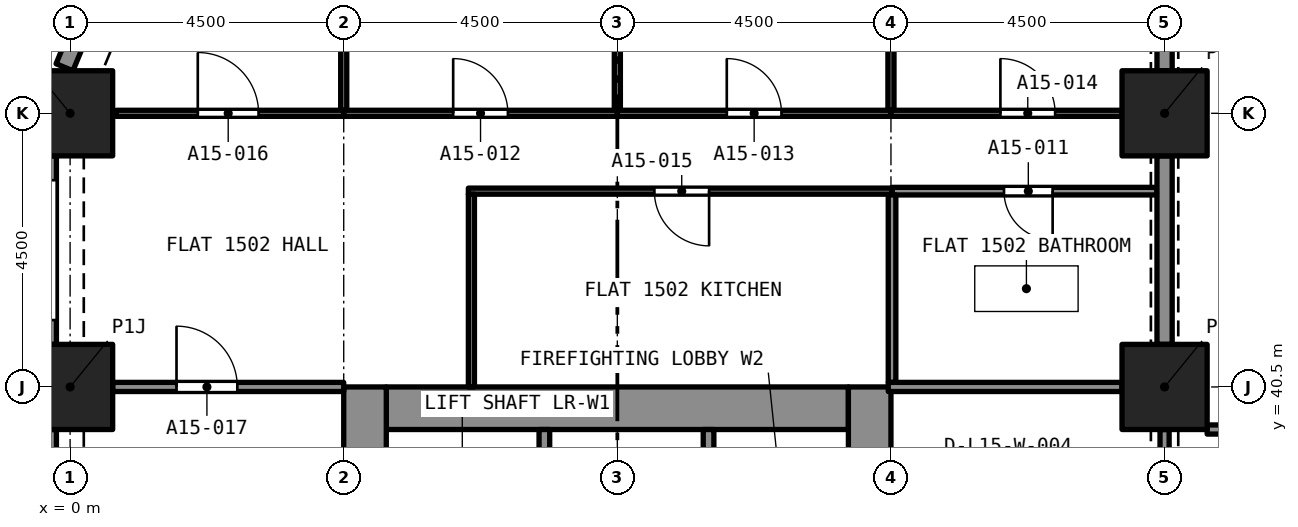
"""IFC4 building model, lengths in metres.
Left out: names, types, materials, properties, quantities, classifications, styles, units other than length and angle.
Written with IfcOpenShell. Run it as: python <this file> out.ifc"""

import sys

from ifc_helpers import new_model, si_unit, direction, frame, frame_2d, origin, origin_2d, place, context, subcontext, project, spatial, rectangle, extrude, element, fill, save


model = new_model("IFC4")
c1 = context("Model", 3, precision=1e-05, world=origin(), true_north=direction((0.0, 1.0)))
c2 = subcontext(c1, "Body", "Model", "MODEL_VIEW")
j1 = project(units=[si_unit("LENGTHUNIT", "METRE"), si_unit("PLANEANGLEUNIT", "RADIAN")], contexts=[c1])
p1 = place(None, origin())
s1 = spatial("IfcSite", under=j1, at=p1, CompositionType="ELEMENT")
p2 = place(p1, origin())
s2 = spatial("IfcBuilding", under=s1, at=p2, CompositionType="ELEMENT")
p3 = place(p2, frame((0.0, 0.0, 59.2)))
s3 = spatial("IfcBuildingStorey", under=s2, at=p3, CompositionType="ELEMENT", Elevation=59.2)
for number, where, z_axis, x_axis in (
    (1, (0.0, 40.5, 0.0), (0.0, 0.0, 1.0), (1.0, 0.0, 0.0)),
    (2, (18.0, 40.5, 0.0), (0.0, 0.0, 1.0), (1.0, 0.0, 0.0)),
    (3, (0.0, 45.0, 0.0), (0.0, 0.0, 1.0), (1.0, 0.0, 0.0)),
    (4, (18.0, 45.0, 0.0), (0.0, 0.0, 1.0), (1.0, 0.0, 0.0)),
):
    element("IfcColumn", number, at=place(p3, frame(where, z_axis=z_axis, x_axis=x_axis)), inside=s3, PredefinedType="COLUMN", context=c2, shape_type="SweptSolid", body=[
        extrude(rectangle(XDim=1.4, YDim=1.4, at=origin_2d()), origin(), (0.0, 0.0, 1.0), 3.2),
    ])
p4 = place(p3, frame((5.2, 40.15, 0.0), z_axis=(0.0, 0.0, 1.0), x_axis=(1.0, 0.0, 0.0)))
e5 = element("IfcWall", 5, at=p4, inside=s3, PredefinedType="SOLIDWALL", context=c2, shape_type="SweptSolid", body=[
    extrude(rectangle(XDim=7.6, YDim=0.7, at=frame_2d((3.8, 0.0))), origin(), (0.0, 0.0, 1.0), 3.2),
])
p5 = place(p3, frame((4.85, 27.0, 0.0), z_axis=(0.0, 0.0, 1.0), x_axis=(0.0, 1.0, 0.0)))
e6 = element("IfcWall", 6, at=p5, inside=s3, PredefinedType="SOLIDWALL", context=c2, shape_type="SweptSolid", body=[
    extrude(rectangle(XDim=13.5, YDim=0.7, at=frame_2d((6.75, 0.0))), origin(), (0.0, 0.0, 1.0), 3.2),
])
p6 = place(p5, frame((8.95, 0.0, 0.0)))
e7 = element("IfcOpeningElement", 7, at=p6, cuts=e6, PredefinedType="OPENING", context=c2, shape_type="SweptSolid", body=[
    extrude(rectangle(XDim=1.2, YDim=2.1, at=frame_2d((0.6, 1.05))), frame((0.0, 0.36, 0.0), z_axis=(0.0, -1.0, 0.0), x_axis=(1.0, 0.0, 0.0)), (0.0, 0.0, 1.0), 0.72),
])
p7 = place(p3, frame((13.15, 27.0, 0.0), z_axis=(0.0, 0.0, 1.0), x_axis=(0.0, 1.0, 0.0)))
e8 = element("IfcWall", 8, at=p7, inside=s3, PredefinedType="SOLIDWALL", context=c2, shape_type="SweptSolid", body=[
    extrude(rectangle(XDim=13.5, YDim=0.7, at=frame_2d((6.75, 0.0))), origin(), (0.0, 0.0, 1.0), 3.2),
])
p8 = place(p7, frame((11.1, 0.0, 0.0)))
e9 = element("IfcOpeningElement", 9, at=p8, cuts=e8, PredefinedType="OPENING", context=c2, shape_type="SweptSolid", body=[
    extrude(rectangle(XDim=1.1, YDim=2.1, at=frame_2d((0.55, 1.05))), frame((0.0, 0.36, 0.0), z_axis=(0.0, -1.0, 0.0), x_axis=(1.0, 0.0, 0.0)), (0.0, 0.0, 1.0), 0.72),
])
p9 = place(p7, frame((8.95, 0.0, 0.0)))
e10 = element("IfcOpeningElement", 10, at=p9, cuts=e8, PredefinedType="OPENING", context=c2, shape_type="SweptSolid", body=[
    extrude(rectangle(XDim=1.2, YDim=2.1, at=frame_2d((0.6, 1.05))), frame((0.0, 0.36, 0.0), z_axis=(0.0, -1.0, 0.0), x_axis=(1.0, 0.0, 0.0)), (0.0, 0.0, 1.0), 0.72),
])
p10 = place(p3, frame((-0.092, 45.757, 0.0), z_axis=(0.0, 0.0, 1.0), x_axis=(0.382737135771, 0.923857286003, 0.0)))
e11 = element("IfcWall", 11, at=p10, inside=s3, PredefinedType="SOLIDWALL", context=c2, shape_type="SweptSolid", body=[
    extrude(rectangle(XDim=1.865, YDim=0.3, at=frame_2d((0.933, 0.0))), origin(), (0.0, 0.0, 1.0), 3.2),
])
p11 = place(p10, frame((0.508, 0.0, 0.45)))
e12 = element("IfcOpeningElement", 12, at=p11, cuts=e11, PredefinedType="OPENING", context=c2, shape_type="SweptSolid", body=[
    extrude(rectangle(XDim=1.1, YDim=1.95, at=frame_2d((0.55, 0.975))), frame((0.0, 0.16, 0.0), z_axis=(0.0, -1.0, 0.0), x_axis=(1.0, 0.0, 0.0)), (0.0, 0.0, 1.0), 0.32),
])
p12 = place(p3, frame((-0.375, 41.2, 0.0), z_axis=(0.0, 0.0, 1.0), x_axis=(0.0, 1.0, 0.0)))
e13 = element("IfcWall", 13, at=p12, inside=s3, PredefinedType="SOLIDWALL", context=c2, shape_type="SweptSolid", body=[
    extrude(rectangle(XDim=3.1, YDim=0.3, at=frame_2d((1.55, 0.0))), origin(), (0.0, 0.0, 1.0), 3.2),
])
p13 = place(p12, frame((0.4, 0.0, 0.45)))
e14 = element("IfcOpeningElement", 14, at=p13, cuts=e13, PredefinedType="OPENING", context=c2, shape_type="SweptSolid", body=[
    extrude(rectangle(XDim=2.3, YDim=1.95, at=frame_2d((1.15, 0.975))), frame((0.0, 0.16, 0.0), z_axis=(0.0, -1.0, 0.0), x_axis=(1.0, 0.0, 0.0)), (0.0, 0.0, 1.0), 0.32),
])
p14 = place(p3, frame((-0.375, 36.7, 0.0), z_axis=(0.0, 0.0, 1.0), x_axis=(0.0, 1.0, 0.0)))
e15 = element("IfcWall", 15, at=p14, inside=s3, PredefinedType="SOLIDWALL", context=c2, shape_type="SweptSolid", body=[
    extrude(rectangle(XDim=3.1, YDim=0.3, at=frame_2d((1.55, 0.0))), origin(), (0.0, 0.0, 1.0), 3.2),
])
p15 = place(p14, frame((0.4, 0.0, 0.45)))
e16 = element("IfcOpeningElement", 16, at=p15, cuts=e15, PredefinedType="OPENING", context=c2, shape_type="SweptSolid", body=[
    extrude(rectangle(XDim=2.3, YDim=1.95, at=frame_2d((1.15, 0.975))), frame((0.0, 0.16, 0.0), z_axis=(0.0, -1.0, 0.0), x_axis=(1.0, 0.0, 0.0)), (0.0, 0.0, 1.0), 0.32),
])
p16 = place(p3, frame((17.875, 43.72, 0.0), z_axis=(0.0, 0.0, 1.0), x_axis=(-1.0, 0.0, 0.0)))
e17 = element("IfcWall", 17, at=p16, inside=s3, PredefinedType="PARTITIONING", context=c2, shape_type="SweptSolid", body=[
    extrude(rectangle(XDim=4.357, YDim=0.125, at=frame_2d((2.178, 0.0))), origin(), (0.0, 0.0, 1.0), 2.9),
])
p17 = place(p16, frame((1.716, 0.0, 0.0)))
e18 = element("IfcOpeningElement", 18, at=p17, cuts=e17, PredefinedType="OPENING", context=c2, shape_type="SweptSolid", body=[
    extrude(rectangle(XDim=0.8, YDim=2.1, at=frame_2d((0.4, 1.05))), frame((0.0, 0.073, 0.0), z_axis=(0.0, -1.0, 0.0), x_axis=(1.0, 0.0, 0.0)), (0.0, 0.0, 1.0), 0.145),
])
p18 = place(p3, frame((13.518, 40.575, 0.0), z_axis=(0.0, 0.0, 1.0), x_axis=(0.0, 1.0, 0.0)))
e19 = element("IfcWall", 19, at=p18, inside=s3, PredefinedType="PARTITIONING", context=c2, shape_type="SweptSolid", body=[
    extrude(rectangle(XDim=3.083, YDim=0.125, at=frame_2d((1.541, 0.0))), origin(), (0.0, 0.0, 1.0), 2.9),
])
p19 = place(p3, frame((18.0, 41.2, 0.0), z_axis=(0.0, 0.0, 1.0), x_axis=(0.0, 1.0, 0.0)))
e20 = element("IfcWall", 20, at=p19, inside=s3, PredefinedType="PARTITIONING", context=c2, shape_type="SweptSolid", body=[
    extrude(rectangle(XDim=3.1, YDim=0.25, at=frame_2d((1.55, 0.0))), origin(), (0.0, 0.0, 1.0), 2.38),
])
p20 = place(p3, frame((13.456, 40.5, 0.0), z_axis=(0.0, 0.0, 1.0), x_axis=(1.0, 0.0, 0.0)))
e21 = element("IfcWall", 21, at=p20, inside=s3, PredefinedType="PARTITIONING", context=c2, shape_type="SweptSolid", body=[
    extrude(rectangle(XDim=3.844, YDim=0.15, at=frame_2d((1.922, 0.0))), origin(), (0.0, 0.0, 1.0), 2.9),
])
p21 = place(p3, frame((9.0, 45.05, 0.0), z_axis=(0.0, 0.0, 1.0), x_axis=(0.0, 1.0, 0.0)))
e22 = element("IfcWall", 22, at=p21, inside=s3, PredefinedType="PARTITIONING", context=c2, shape_type="SweptSolid", body=[
    extrude(rectangle(XDim=3.75, YDim=0.1, at=frame_2d((1.875, 0.0))), origin(), (0.0, 0.0, 1.0), 2.9),
])
p22 = place(p3, frame((4.5, 45.0, 0.0), z_axis=(0.0, 0.0, 1.0), x_axis=(1.0, 0.0, 0.0)))
e23 = element("IfcWall", 23, at=p22, inside=s3, PredefinedType="PARTITIONING", context=c2, shape_type="SweptSolid", body=[
    extrude(rectangle(XDim=4.5, YDim=0.1, at=frame_2d((2.25, 0.0))), origin(), (0.0, 0.0, 1.0), 2.9),
])
p23 = place(p22, frame((1.8, 0.0, 0.0)))
e24 = element("IfcOpeningElement", 24, at=p23, cuts=e23, PredefinedType="OPENING", context=c2, shape_type="SweptSolid", body=[
    extrude(rectangle(XDim=0.9, YDim=2.1, at=frame_2d((0.45, 1.05))), frame((0.0, 0.06, 0.0), z_axis=(0.0, -1.0, 0.0), x_axis=(1.0, 0.0, 0.0)), (0.0, 0.0, 1.0), 0.12),
])
p24 = place(p3, frame((4.5, 45.05, 0.0), z_axis=(0.0, 0.0, 1.0), x_axis=(0.0, 1.0, 0.0)))
e25 = element("IfcWall", 25, at=p24, inside=s3, PredefinedType="PARTITIONING", context=c2, shape_type="SweptSolid", body=[
    extrude(rectangle(XDim=3.692, YDim=0.1, at=frame_2d((1.846, 0.0))), origin(), (0.0, 0.0, 1.0), 2.9),
])
p25 = place(p3, frame((13.5, 45.05, 0.0), z_axis=(0.0, 0.0, 1.0), x_axis=(0.0, 1.0, 0.0)))
e26 = element("IfcWall", 26, at=p25, inside=s3, PredefinedType="PARTITIONING", context=c2, shape_type="SweptSolid", body=[
    extrude(rectangle(XDim=3.75, YDim=0.1, at=frame_2d((1.875, 0.0))), origin(), (0.0, 0.0, 1.0), 2.9),
])
p26 = place(p3, frame((9.0, 45.0, 0.0), z_axis=(0.0, 0.0, 1.0), x_axis=(1.0, 0.0, 0.0)))
e27 = element("IfcWall", 27, at=p26, inside=s3, PredefinedType="PARTITIONING", context=c2, shape_type="SweptSolid", body=[
    extrude(rectangle(XDim=4.5, YDim=0.1, at=frame_2d((2.25, 0.0))), origin(), (0.0, 0.0, 1.0), 2.9),
])
p27 = place(p26, frame((1.8, 0.0, 0.0)))
e28 = element("IfcOpeningElement", 28, at=p27, cuts=e27, PredefinedType="OPENING", context=c2, shape_type="SweptSolid", body=[
    extrude(rectangle(XDim=0.9, YDim=2.1, at=frame_2d((0.45, 1.05))), frame((0.0, 0.06, 0.0), z_axis=(0.0, -1.0, 0.0), x_axis=(1.0, 0.0, 0.0)), (0.0, 0.0, 1.0), 0.12),
])
p28 = place(p3, frame((13.5, 45.0, 0.0), z_axis=(0.0, 0.0, 1.0), x_axis=(1.0, 0.0, 0.0)))
e29 = element("IfcWall", 29, at=p28, inside=s3, PredefinedType="PARTITIONING", context=c2, shape_type="SweptSolid", body=[
    extrude(rectangle(XDim=3.8, YDim=0.1, at=frame_2d((1.9, 0.0))), origin(), (0.0, 0.0, 1.0), 2.9),
])
p29 = place(p28, frame((1.8, 0.0, 0.0)))
e30 = element("IfcOpeningElement", 30, at=p29, cuts=e29, PredefinedType="OPENING", context=c2, shape_type="SweptSolid", body=[
    extrude(rectangle(XDim=0.9, YDim=2.1, at=frame_2d((0.45, 1.05))), frame((0.0, 0.06, 0.0), z_axis=(0.0, -1.0, 0.0), x_axis=(1.0, 0.0, 0.0)), (0.0, 0.0, 1.0), 0.12),
])
p30 = place(p3, frame((18.0, 45.7, 0.0), z_axis=(0.0, 0.0, 1.0), x_axis=(0.0, 1.0, 0.0)))
e31 = element("IfcWall", 31, at=p30, inside=s3, PredefinedType="PARTITIONING", context=c2, shape_type="SweptSolid", body=[
    extrude(rectangle(XDim=3.1, YDim=0.25, at=frame_2d((1.55, 0.0))), origin(), (0.0, 0.0, 1.0), 2.38),
])
p31 = place(p3, frame((13.518, 43.72, 0.0), z_axis=(0.0, 0.0, 1.0), x_axis=(-1.0, 0.0, 0.0)))
e32 = element("IfcWall", 32, at=p31, inside=s3, PredefinedType="PARTITIONING", context=c2, shape_type="SweptSolid", body=[
    extrude(rectangle(XDim=6.968, YDim=0.1, at=frame_2d((3.484, 0.0))), origin(), (0.0, 0.0, 1.0), 2.9),
])
p32 = place(p31, frame((3.009, 0.0, 0.0)))
e33 = element("IfcOpeningElement", 33, at=p32, cuts=e32, PredefinedType="OPENING", context=c2, shape_type="SweptSolid", body=[
    extrude(rectangle(XDim=0.9, YDim=2.1, at=frame_2d((0.45, 1.05))), frame((0.0, 0.06, 0.0), z_axis=(0.0, -1.0, 0.0), x_axis=(1.0, 0.0, 0.0)), (0.0, 0.0, 1.0), 0.12),
])
p33 = place(p3, frame((6.6, 40.5, 0.0), z_axis=(0.0, 0.0, 1.0), x_axis=(0.0, 1.0, 0.0)))
e34 = element("IfcWall", 34, at=p33, inside=s3, PredefinedType="PARTITIONING", context=c2, shape_type="SweptSolid", body=[
    extrude(rectangle(XDim=3.17, YDim=0.1, at=frame_2d((1.585, 0.0))), origin(), (0.0, 0.0, 1.0), 2.9),
])
p34 = place(p3, frame((0.758, 45.0, 0.0), z_axis=(0.0, 0.0, 1.0), x_axis=(1.0, 0.0, 0.0)))
e35 = element("IfcWall", 35, at=p34, inside=s3, PredefinedType="PARTITIONING", context=c2, shape_type="SweptSolid", body=[
    extrude(rectangle(XDim=3.742, YDim=0.1, at=frame_2d((1.871, 0.0))), origin(), (0.0, 0.0, 1.0), 2.9),
])
p35 = place(p34, frame((1.342, 0.0, 0.0)))
e36 = element("IfcOpeningElement", 36, at=p35, cuts=e35, PredefinedType="OPENING", context=c2, shape_type="SweptSolid", body=[
    extrude(rectangle(XDim=1.0, YDim=2.1, at=frame_2d((0.5, 1.05))), frame((0.0, 0.06, 0.0), z_axis=(0.0, -1.0, 0.0), x_axis=(1.0, 0.0, 0.0)), (0.0, 0.0, 1.0), 0.12),
])
p36 = place(p3, frame((0.7, 40.5, 0.0), z_axis=(0.0, 0.0, 1.0), x_axis=(1.0, 0.0, 0.0)))
e37 = element("IfcWall", 37, at=p36, inside=s3, PredefinedType="PARTITIONING", context=c2, shape_type="SweptSolid", body=[
    extrude(rectangle(XDim=3.8, YDim=0.15, at=frame_2d((1.9, 0.0))), origin(), (0.0, 0.0, 1.0), 2.9),
])
p37 = place(p36, frame((1.05, 0.0, 0.0)))
e38 = element("IfcOpeningElement", 38, at=p37, cuts=e37, PredefinedType="OPENING", context=c2, shape_type="SweptSolid", body=[
    extrude(rectangle(XDim=1.0, YDim=2.1, at=frame_2d((0.5, 1.05))), frame((0.0, 0.085, 0.0), z_axis=(0.0, -1.0, 0.0), x_axis=(1.0, 0.0, 0.0)), (0.0, 0.0, 1.0), 0.17),
])
p38 = place(p3, frame((18.7, 39.8, 0.0), z_axis=(0.0, 0.0, 1.0), x_axis=(1.0, 0.0, 0.0)))
e39 = element("IfcWall", 39, at=p38, inside=s3, PredefinedType="PARTITIONING", context=c2, shape_type="SweptSolid", body=[
    extrude(rectangle(XDim=8.3, YDim=0.15, at=frame_2d((4.15, 0.0))), origin(), (0.0, 0.0, 1.0), 2.75),
])
p39 = place(p38, frame((3.3, 0.0, 0.0)))
e40 = element("IfcOpeningElement", 40, at=p39, cuts=e39, PredefinedType="OPENING", context=c2, shape_type="SweptSolid", body=[
    extrude(rectangle(XDim=1.0, YDim=2.1, at=frame_2d((0.5, 1.05))), frame((0.0, 0.085, 0.0), z_axis=(0.0, -1.0, 0.0), x_axis=(1.0, 0.0, 0.0)), (0.0, 0.0, 1.0), 0.17),
])
p40 = place(p3, frame((18.0, 39.8, 0.0), z_axis=(0.0, 0.0, 1.0), x_axis=(0.0, -1.0, 0.0)))
e41 = element("IfcWall", 41, at=p40, inside=s3, PredefinedType="PARTITIONING", context=c2, shape_type="SweptSolid", body=[
    extrude(rectangle(XDim=3.1, YDim=0.15, at=frame_2d((1.55, 0.0))), origin(), (0.0, 0.0, 1.0), 2.38),
])
p41 = place(p40, frame((0.95, 0.0, 0.0)))
e42 = element("IfcOpeningElement", 42, at=p41, cuts=e41, PredefinedType="OPENING", context=c2, shape_type="SweptSolid", body=[
    extrude(rectangle(XDim=1.2, YDim=2.1, at=frame_2d((0.6, 1.05))), frame((0.0, 0.085, 0.0), z_axis=(0.0, -1.0, 0.0), x_axis=(1.0, 0.0, 0.0)), (0.0, 0.0, 1.0), 0.17),
])
p42 = place(p3, frame((7.8, 37.5, 0.0), z_axis=(0.0, 0.0, 1.0), x_axis=(0.0, 1.0, 0.0)))
e43 = element("IfcWall", 43, at=p42, inside=s3, PredefinedType="SOLIDWALL", context=c2, shape_type="SweptSolid", body=[
    extrude(rectangle(XDim=2.3, YDim=0.175, at=frame_2d((1.15, 0.0))), origin(), (0.0, 0.0, 1.0), 2.9),
])
p43 = place(p3, frame((10.5, 37.5, 0.0), z_axis=(0.0, 0.0, 1.0), x_axis=(0.0, 1.0, 0.0)))
e44 = element("IfcWall", 44, at=p43, inside=s3, PredefinedType="SOLIDWALL", context=c2, shape_type="SweptSolid", body=[
    extrude(rectangle(XDim=2.3, YDim=0.175, at=frame_2d((1.15, 0.0))), origin(), (0.0, 0.0, 1.0), 2.9),
])
p44 = place(p43, frame((0.65, 0.0, 0.0)))
e45 = element("IfcOpeningElement", 45, at=p44, cuts=e44, PredefinedType="OPENING", context=c2, shape_type="SweptSolid", body=[
    extrude(rectangle(XDim=1.0, YDim=2.1, at=frame_2d((0.5, 1.05))), frame((0.0, 0.097, 0.0), z_axis=(0.0, -1.0, 0.0), x_axis=(1.0, 0.0, 0.0)), (0.0, 0.0, 1.0), 0.195),
])
p45 = place(p17, origin())
e46 = element("IfcDoor", 46, at=p45, inside=s3, OperationType="SINGLE_SWING_LEFT", PredefinedType="DOOR", context=c2, shape_type="SweptSolid", body=[
    extrude(rectangle(XDim=0.8, YDim=2.1, at=frame_2d((0.4, 1.05))), frame((0.0, 0.025, 0.0), z_axis=(0.0, -1.0, 0.0), x_axis=(1.0, 0.0, 0.0)), (0.0, 0.0, 1.0), 0.05),
])
fill(e18, e46)
p46 = place(p23, origin())
e47 = element("IfcDoor", 47, at=p46, inside=s3, OperationType="SINGLE_SWING_RIGHT", PredefinedType="DOOR", context=c2, shape_type="SweptSolid", body=[
    extrude(rectangle(XDim=0.9, YDim=2.1, at=frame_2d((0.45, 1.05))), frame((0.0, 0.025, 0.0), z_axis=(0.0, -1.0, 0.0), x_axis=(1.0, 0.0, 0.0)), (0.0, 0.0, 1.0), 0.05),
])
fill(e24, e47)
p47 = place(p27, origin())
e48 = element("IfcDoor", 48, at=p47, inside=s3, OperationType="SINGLE_SWING_LEFT", PredefinedType="DOOR", context=c2, shape_type="SweptSolid", body=[
    extrude(rectangle(XDim=0.9, YDim=2.1, at=frame_2d((0.45, 1.05))), frame((0.0, 0.025, 0.0), z_axis=(0.0, -1.0, 0.0), x_axis=(1.0, 0.0, 0.0)), (0.0, 0.0, 1.0), 0.05),
])
fill(e28, e48)
p48 = place(p29, origin())
e49 = element("IfcDoor", 49, at=p48, inside=s3, OperationType="SINGLE_SWING_RIGHT", PredefinedType="DOOR", context=c2, shape_type="SweptSolid", body=[
    extrude(rectangle(XDim=0.9, YDim=2.1, at=frame_2d((0.45, 1.05))), frame((0.0, 0.025, 0.0), z_axis=(0.0, -1.0, 0.0), x_axis=(1.0, 0.0, 0.0)), (0.0, 0.0, 1.0), 0.05),
])
fill(e30, e49)
p49 = place(p32, origin())
e50 = element("IfcDoor", 50, at=p49, inside=s3, OperationType="SINGLE_SWING_LEFT", PredefinedType="DOOR", context=c2, shape_type="SweptSolid", body=[
    extrude(rectangle(XDim=0.9, YDim=2.1, at=frame_2d((0.45, 1.05))), frame((0.0, 0.025, 0.0), z_axis=(0.0, -1.0, 0.0), x_axis=(1.0, 0.0, 0.0)), (0.0, 0.0, 1.0), 0.05),
])
fill(e33, e50)
p50 = place(p35, origin())
e51 = element("IfcDoor", 51, at=p50, inside=s3, OperationType="SINGLE_SWING_LEFT", PredefinedType="DOOR", context=c2, shape_type="SweptSolid", body=[
    extrude(rectangle(XDim=1.0, YDim=2.1, at=frame_2d((0.5, 1.05))), frame((0.0, 0.025, 0.0), z_axis=(0.0, -1.0, 0.0), x_axis=(1.0, 0.0, 0.0)), (0.0, 0.0, 1.0), 0.05),
])
fill(e36, e51)
p51 = place(p37, origin())
e52 = element("IfcDoor", 52, at=p51, inside=s3, OperationType="SINGLE_SWING_LEFT", PredefinedType="DOOR", context=c2, shape_type="SweptSolid", body=[
    extrude(rectangle(XDim=1.0, YDim=2.1, at=frame_2d((0.5, 1.05))), frame((0.0, 0.025, 0.0), z_axis=(0.0, -1.0, 0.0), x_axis=(1.0, 0.0, 0.0)), (0.0, 0.0, 1.0), 0.05),
])
fill(e38, e52)
save(model, sys.argv[1])
